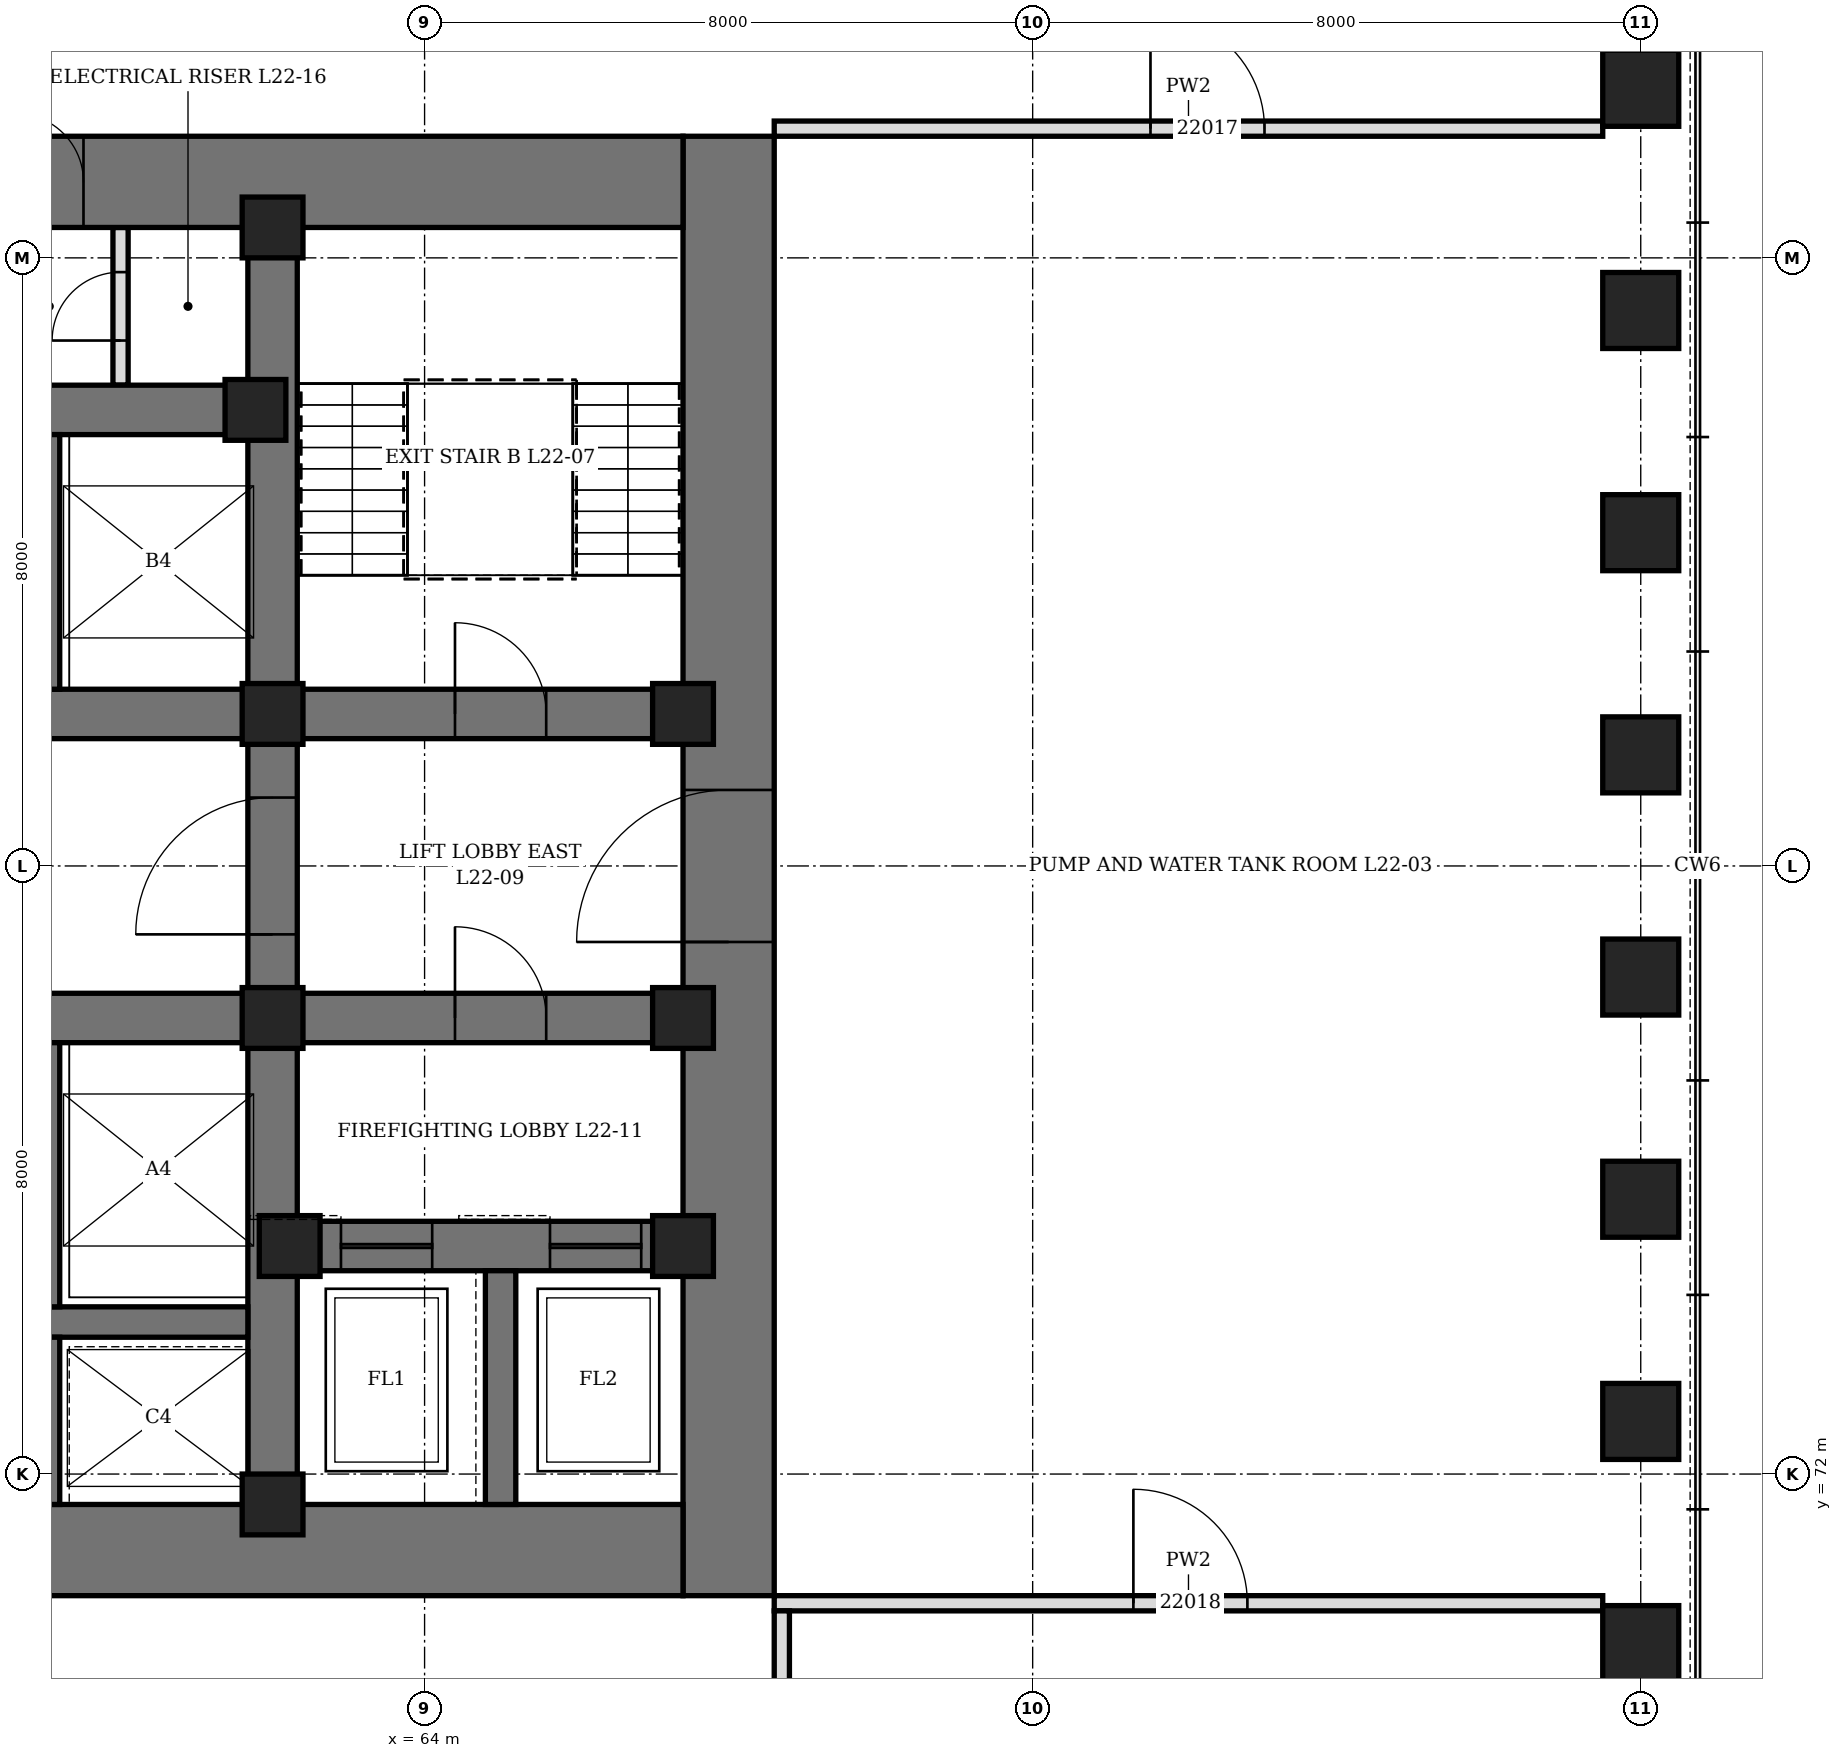
"""IFC4 building model, lengths in metres.
Left out: names, types, materials, properties, quantities, classifications, styles, units other than length and angle.
Written with IfcOpenShell. Run it as: python <this file> out.ifc"""

import sys

from ifc_helpers import new_model, si_unit, direction, frame, frame_2d, origin, origin_2d, place, context, subcontext, project, spatial, rectangle, hollow_rectangle, extrude, element, fill, save


model = new_model("IFC4")
c1 = context("Model", 3, precision=1e-05, world=origin(), true_north=direction((0.0, 1.0)))
c2 = subcontext(c1, "Body", "Model", "MODEL_VIEW")
j1 = project(units=[si_unit("LENGTHUNIT", "METRE"), si_unit("PLANEANGLEUNIT", "RADIAN")], contexts=[c1])
p1 = place(None, origin())
s1 = spatial("IfcSite", under=j1, at=p1, CompositionType="ELEMENT")
p2 = place(p1, origin())
s2 = spatial("IfcBuilding", under=s1, at=p2, CompositionType="ELEMENT")
p3 = place(p2, frame((0.0, 0.0, 102.1)))
s3 = spatial("IfcBuildingStorey", under=s2, at=p3, CompositionType="ELEMENT", Elevation=102.1)
for number, where, z_axis, x_axis in (
    (1, (80.0, 69.769, 0.0), (0.0, 0.0, 1.0), (0.0, 1.0, 0.0)),
    (2, (80.0, 72.692, 0.0), (0.0, 0.0, 1.0), (0.0, 1.0, 0.0)),
    (3, (80.0, 75.615, 0.0), (0.0, 0.0, 1.0), (0.0, 1.0, 0.0)),
    (4, (80.0, 78.539, 0.0), (0.0, 0.0, 1.0), (0.0, 1.0, 0.0)),
    (5, (80.0, 81.461, 0.0), (0.0, 0.0, 1.0), (0.0, 1.0, 0.0)),
    (6, (80.0, 84.385, 0.0), (0.0, 0.0, 1.0), (0.0, 1.0, 0.0)),
    (7, (80.0, 87.308, 0.0), (0.0, 0.0, 1.0), (0.0, 1.0, 0.0)),
    (8, (80.0, 90.231, 0.0), (0.0, 0.0, 1.0), (0.0, 1.0, 0.0)),
):
    element("IfcColumn", number, at=place(p3, frame(where, z_axis=z_axis, x_axis=x_axis)), inside=s3, PredefinedType="COLUMN", context=c2, shape_type="SweptSolid", body=[
        extrude(hollow_rectangle(XDim=1.0, YDim=1.0, WallThickness=0.35, at=origin_2d()), origin(), (0.0, 0.0, 1.0), 5.75),
    ])
p4 = place(p3, frame((68.0, 70.4, 0.0), z_axis=(0.0, 0.0, 1.0), x_axis=(0.0, 1.0, 0.0)))
e9 = element("IfcWall", 9, at=p4, inside=s3, PredefinedType="SHEAR", context=c2, shape_type="SweptSolid", body=[
    extrude(rectangle(XDim=19.2, YDim=1.2, at=frame_2d((9.6, 0.0))), origin(), (0.0, 0.0, 1.0), 6.0),
])
p5 = place(p4, frame((8.6, 0.0, 0.0)))
e10 = element("IfcOpeningElement", 10, at=p5, cuts=e9, PredefinedType="OPENING", context=c2, shape_type="SweptSolid", body=[
    extrude(rectangle(XDim=2.0, YDim=2.4, at=frame_2d((1.0, 1.2))), frame((0.0, 0.61, 0.0), z_axis=(0.0, -1.0, 0.0), x_axis=(1.0, 0.0, 0.0)), (0.0, 0.0, 1.0), 1.22),
])
p6 = place(p3, frame((44.6, 71.0, 0.0), z_axis=(0.0, 0.0, 1.0), x_axis=(1.0, 0.0, 0.0)))
e11 = element("IfcWall", 11, at=p6, inside=s3, PredefinedType="SHEAR", context=c2, shape_type="SweptSolid", body=[
    extrude(rectangle(XDim=22.8, YDim=1.2, at=frame_2d((11.4, 0.0))), origin(), (0.0, 0.0, 1.0), 6.0),
])
p7 = place(p3, frame((44.6, 89.0, 0.0), z_axis=(0.0, 0.0, 1.0), x_axis=(1.0, 0.0, 0.0)))
e12 = element("IfcWall", 12, at=p7, inside=s3, PredefinedType="SHEAR", context=c2, shape_type="SweptSolid", body=[
    extrude(rectangle(XDim=22.8, YDim=1.2, at=frame_2d((11.4, 0.0))), origin(), (0.0, 0.0, 1.0), 6.0),
])
p8 = place(p7, frame((7.9, 0.0, 0.0)))
e13 = element("IfcOpeningElement", 13, at=p8, cuts=e12, PredefinedType="OPENING", context=c2, shape_type="SweptSolid", body=[
    extrude(rectangle(XDim=1.0, YDim=2.1, at=frame_2d((0.5, 1.05))), frame((0.0, 0.61, 0.0), z_axis=(0.0, -1.0, 0.0), x_axis=(1.0, 0.0, 0.0)), (0.0, 0.0, 1.0), 1.22),
])
p9 = place(p7, frame((12.125, 0.0, 0.0)))
e14 = element("IfcOpeningElement", 14, at=p9, cuts=e12, PredefinedType="OPENING", context=c2, shape_type="SweptSolid", body=[
    extrude(rectangle(XDim=0.9, YDim=2.1, at=frame_2d((0.45, 1.05))), frame((0.0, 0.61, 0.0), z_axis=(0.0, -1.0, 0.0), x_axis=(1.0, 0.0, 0.0)), (0.0, 0.0, 1.0), 1.22),
])
p10 = place(p7, frame((14.012, 0.0, 0.0)))
e15 = element("IfcOpeningElement", 15, at=p10, cuts=e12, PredefinedType="OPENING", context=c2, shape_type="SweptSolid", body=[
    extrude(rectangle(XDim=0.9, YDim=2.1, at=frame_2d((0.45, 1.05))), frame((0.0, 0.61, 0.0), z_axis=(0.0, -1.0, 0.0), x_axis=(1.0, 0.0, 0.0)), (0.0, 0.0, 1.0), 1.22),
])
p11 = place(p3, frame((62.0, 71.6, 0.0), z_axis=(0.0, 0.0, 1.0), x_axis=(0.0, 1.0, 0.0)))
e16 = element("IfcWall", 16, at=p11, inside=s3, PredefinedType="SHEAR", context=c2, shape_type="SweptSolid", body=[
    extrude(rectangle(XDim=16.8, YDim=0.65, at=frame_2d((8.4, 0.0))), origin(), (0.0, 0.0, 1.0), 6.0),
])
p12 = place(p11, frame((7.5, 0.0, 0.0)))
e17 = element("IfcOpeningElement", 17, at=p12, cuts=e16, PredefinedType="OPENING", context=c2, shape_type="SweptSolid", body=[
    extrude(rectangle(XDim=1.8, YDim=2.4, at=frame_2d((0.9, 1.2))), frame((0.0, 0.335, 0.0), z_axis=(0.0, -1.0, 0.0), x_axis=(1.0, 0.0, 0.0)), (0.0, 0.0, 1.0), 0.67),
])
p13 = place(p3, frame((62.325, 75.0, 0.0), z_axis=(0.0, 0.0, 1.0), x_axis=(1.0, 0.0, 0.0)))
e18 = element("IfcWall", 18, at=p13, inside=s3, PredefinedType="SHEAR", context=c2, shape_type="SweptSolid", body=[
    extrude(rectangle(XDim=5.075, YDim=0.65, at=frame_2d((2.538, 0.0))), origin(), (0.0, 0.0, 1.0), 6.0),
])
p14 = place(p13, frame((0.575, 0.0, 0.0)))
e19 = element("IfcOpeningElement", 19, at=p14, cuts=e18, PredefinedType="OPENING", context=c2, shape_type="SweptSolid", body=[
    extrude(rectangle(XDim=1.2, YDim=2.2, at=frame_2d((0.6, 1.1))), frame((0.0, 0.335, 0.0), z_axis=(0.0, -1.0, 0.0), x_axis=(1.0, 0.0, 0.0)), (0.0, 0.0, 1.0), 0.67),
])
p15 = place(p13, frame((3.325, 0.0, 0.0)))
e20 = element("IfcOpeningElement", 20, at=p15, cuts=e18, PredefinedType="OPENING", context=c2, shape_type="SweptSolid", body=[
    extrude(rectangle(XDim=1.2, YDim=2.2, at=frame_2d((0.6, 1.1))), frame((0.0, 0.335, 0.0), z_axis=(0.0, -1.0, 0.0), x_axis=(1.0, 0.0, 0.0)), (0.0, 0.0, 1.0), 0.67),
])
p16 = place(p3, frame((62.325, 78.0, 0.0), z_axis=(0.0, 0.0, 1.0), x_axis=(1.0, 0.0, 0.0)))
e21 = element("IfcWall", 21, at=p16, inside=s3, PredefinedType="SHEAR", context=c2, shape_type="SweptSolid", body=[
    extrude(rectangle(XDim=5.075, YDim=0.65, at=frame_2d((2.538, 0.0))), origin(), (0.0, 0.0, 1.0), 6.0),
])
p17 = place(p16, frame((2.075, 0.0, 0.0)))
e22 = element("IfcOpeningElement", 22, at=p17, cuts=e21, PredefinedType="OPENING", context=c2, shape_type="SweptSolid", body=[
    extrude(rectangle(XDim=1.2, YDim=2.1, at=frame_2d((0.6, 1.05))), frame((0.0, 0.335, 0.0), z_axis=(0.0, -1.0, 0.0), x_axis=(1.0, 0.0, 0.0)), (0.0, 0.0, 1.0), 0.67),
])
p18 = place(p3, frame((62.325, 82.0, 0.0), z_axis=(0.0, 0.0, 1.0), x_axis=(1.0, 0.0, 0.0)))
e23 = element("IfcWall", 23, at=p18, inside=s3, PredefinedType="SHEAR", context=c2, shape_type="SweptSolid", body=[
    extrude(rectangle(XDim=5.075, YDim=0.65, at=frame_2d((2.538, 0.0))), origin(), (0.0, 0.0, 1.0), 6.0),
])
p19 = place(p18, frame((2.075, 0.0, 0.0)))
e24 = element("IfcOpeningElement", 24, at=p19, cuts=e23, PredefinedType="OPENING", context=c2, shape_type="SweptSolid", body=[
    extrude(rectangle(XDim=1.2, YDim=2.1, at=frame_2d((0.6, 1.05))), frame((0.0, 0.335, 0.0), z_axis=(0.0, -1.0, 0.0), x_axis=(1.0, 0.0, 0.0)), (0.0, 0.0, 1.0), 0.67),
])
for number, where, z_axis, x_axis in (
    (25, (50.325, 78.0, 0.0), (0.0, 0.0, 1.0), (1.0, 0.0, 0.0)),
    (26, (50.325, 82.0, 0.0), (0.0, 0.0, 1.0), (1.0, 0.0, 0.0)),
    (27, (50.325, 86.0, 0.0), (0.0, 0.0, 1.0), (1.0, 0.0, 0.0)),
):
    element("IfcWall", number, at=place(p3, frame(where, z_axis=z_axis, x_axis=x_axis)), inside=s3, PredefinedType="SHEAR", context=c2, shape_type="SweptSolid", body=[
        extrude(rectangle(XDim=11.35, YDim=0.65, at=frame_2d((5.675, 0.0))), origin(), (0.0, 0.0, 1.0), 6.0),
    ])
p20 = place(p3, frame((50.325, 74.0, 0.0), z_axis=(0.0, 0.0, 1.0), x_axis=(1.0, 0.0, 0.0)))
e28 = element("IfcWall", 28, at=p20, inside=s3, PredefinedType="SHEAR", context=c2, shape_type="SweptSolid", body=[
    extrude(rectangle(XDim=11.35, YDim=0.4, at=frame_2d((5.675, 0.0))), origin(), (0.0, 0.0, 1.0), 6.0),
])
p21 = place(p3, frame((59.0, 71.6, 0.0), z_axis=(0.0, 0.0, 1.0), x_axis=(0.0, 1.0, 0.0)))
e29 = element("IfcWall", 29, at=p21, inside=s3, PredefinedType="SHEAR", context=c2, shape_type="SweptSolid", body=[
    extrude(rectangle(XDim=2.2, YDim=0.4, at=frame_2d((1.1, 0.0))), origin(), (0.0, 0.0, 1.0), 6.0),
])
p22 = place(p3, frame((59.0, 74.2, 0.0), z_axis=(0.0, 0.0, 1.0), x_axis=(0.0, 1.0, 0.0)))
e30 = element("IfcWall", 30, at=p22, inside=s3, PredefinedType="SHEAR", context=c2, shape_type="SweptSolid", body=[
    extrude(rectangle(XDim=3.475, YDim=0.4, at=frame_2d((1.738, 0.0))), origin(), (0.0, 0.0, 1.0), 6.0),
])
p23 = place(p3, frame((59.0, 82.325, 0.0), z_axis=(0.0, 0.0, 1.0), x_axis=(0.0, 1.0, 0.0)))
e31 = element("IfcWall", 31, at=p23, inside=s3, PredefinedType="SHEAR", context=c2, shape_type="SweptSolid", body=[
    extrude(rectangle(XDim=3.35, YDim=0.4, at=frame_2d((1.675, 0.0))), origin(), (0.0, 0.0, 1.0), 6.0),
])
p24 = place(p3, frame((65.0, 71.6, 0.0), z_axis=(0.0, 0.0, 1.0), x_axis=(0.0, 1.0, 0.0)))
e32 = element("IfcWall", 32, at=p24, inside=s3, PredefinedType="SHEAR", context=c2, shape_type="SweptSolid", body=[
    extrude(rectangle(XDim=3.075, YDim=0.4, at=frame_2d((1.538, 0.0))), origin(), (0.0, 0.0, 1.0), 6.0),
])
for number, where, z_axis, x_axis in (
    (33, (61.775, 86.0, 0.0), (0.0, 0.0, 1.0), (1.0, 0.0, 0.0)),
    (34, (62.0, 71.6, 0.0), (0.0, 0.0, 1.0), (1.0, 0.0, 0.0)),
    (35, (62.0, 78.0, 0.0), (0.0, 0.0, 1.0), (1.0, 0.0, 0.0)),
    (36, (62.0, 82.0, 0.0), (0.0, 0.0, 1.0), (1.0, 0.0, 0.0)),
    (37, (62.0, 88.4, 0.0), (0.0, 0.0, 1.0), (1.0, 0.0, 0.0)),
    (38, (62.225, 75.0, 0.0), (0.0, 0.0, 1.0), (1.0, 0.0, 0.0)),
    (39, (67.4, 75.0, 0.0), (0.0, 0.0, 1.0), (1.0, 0.0, 0.0)),
    (40, (67.4, 78.0, 0.0), (0.0, 0.0, 1.0), (1.0, 0.0, 0.0)),
    (41, (67.4, 82.0, 0.0), (0.0, 0.0, 1.0), (1.0, 0.0, 0.0)),
):
    element("IfcColumn", number, at=place(p3, frame(where, z_axis=z_axis, x_axis=x_axis)), inside=s3, PredefinedType="COLUMN", context=c2, shape_type="SweptSolid", body=[
        extrude(hollow_rectangle(XDim=0.8, YDim=0.8, WallThickness=0.1, at=origin_2d()), origin(), (0.0, 0.0, 1.0), 6.0),
    ])
p25 = place(p3, frame((60.0, 86.325, 0.0), z_axis=(0.0, 0.0, 1.0), x_axis=(0.0, 1.0, 0.0)))
e42 = element("IfcWall", 42, at=p25, inside=s3, PredefinedType="PARTITIONING", context=c2, shape_type="SweptSolid", body=[
    extrude(rectangle(XDim=2.075, YDim=0.2, at=frame_2d((1.038, 0.0))), origin(), (0.0, 0.0, 1.0), 5.75),
])
p26 = place(p25, frame((0.587, 0.0, 0.0)))
e43 = element("IfcOpeningElement", 43, at=p26, cuts=e42, PredefinedType="OPENING", context=c2, shape_type="SweptSolid", body=[
    extrude(rectangle(XDim=0.9, YDim=2.1, at=frame_2d((0.45, 1.05))), frame((0.0, 0.11, 0.0), z_axis=(0.0, -1.0, 0.0), x_axis=(1.0, 0.0, 0.0)), (0.0, 0.0, 1.0), 0.22),
])
p27 = place(p3, frame((68.6, 89.7, 0.0), z_axis=(0.0, 0.0, 1.0), x_axis=(1.0, 0.0, 0.0)))
e44 = element("IfcWall", 44, at=p27, inside=s3, PredefinedType="PARTITIONING", context=c2, shape_type="SweptSolid", body=[
    extrude(rectangle(XDim=10.9, YDim=0.2, at=frame_2d((5.45, 0.0))), origin(), (0.0, 0.0, 1.0), 4.25),
])
p28 = place(p27, frame((4.95, 0.0, 0.0)))
e45 = element("IfcOpeningElement", 45, at=p28, cuts=e44, PredefinedType="OPENING", context=c2, shape_type="SweptSolid", body=[
    extrude(rectangle(XDim=1.5, YDim=2.4, at=frame_2d((0.75, 1.2))), frame((0.0, 0.11, 0.0), z_axis=(0.0, -1.0, 0.0), x_axis=(1.0, 0.0, 0.0)), (0.0, 0.0, 1.0), 0.22),
])
p29 = place(p3, frame((68.6, 70.3, 0.0), z_axis=(0.0, 0.0, 1.0), x_axis=(1.0, 0.0, 0.0)))
e46 = element("IfcWall", 46, at=p29, inside=s3, PredefinedType="PARTITIONING", context=c2, shape_type="SweptSolid", body=[
    extrude(rectangle(XDim=10.9, YDim=0.2, at=frame_2d((5.45, 0.0))), origin(), (0.0, 0.0, 1.0), 4.25),
])
p30 = place(p29, frame((4.725, 0.0, 0.0)))
e47 = element("IfcOpeningElement", 47, at=p30, cuts=e46, PredefinedType="OPENING", context=c2, shape_type="SweptSolid", body=[
    extrude(rectangle(XDim=1.5, YDim=2.4, at=frame_2d((0.75, 1.2))), frame((0.0, 0.11, 0.0), z_axis=(0.0, -1.0, 0.0), x_axis=(1.0, 0.0, 0.0)), (0.0, 0.0, 1.0), 0.22),
])
p31 = place(p3, frame((68.7, 70.2, 0.0), z_axis=(0.0, 0.0, 1.0), x_axis=(0.0, -1.0, 0.0)))
e48 = element("IfcWall", 48, at=p31, inside=s3, PredefinedType="PARTITIONING", context=c2, shape_type="SweptSolid", body=[
    extrude(rectangle(XDim=13.7, YDim=0.2, at=frame_2d((6.85, 0.0))), origin(), (0.0, 0.0, 1.0), 4.25),
])
p32 = place(p31, frame((6.025, 0.0, 0.0)))
e49 = element("IfcOpeningElement", 49, at=p32, cuts=e48, PredefinedType="OPENING", context=c2, shape_type="SweptSolid", body=[
    extrude(rectangle(XDim=1.5, YDim=2.4, at=frame_2d((0.75, 1.2))), frame((0.0, 0.11, 0.0), z_axis=(0.0, -1.0, 0.0), x_axis=(1.0, 0.0, 0.0)), (0.0, 0.0, 1.0), 0.22),
])
p33 = place(p10, origin())
e50 = element("IfcDoor", 50, at=p33, inside=s3, OperationType="SINGLE_SWING_LEFT", PredefinedType="DOOR", context=c2, shape_type="SweptSolid", body=[
    extrude(rectangle(XDim=0.9, YDim=2.1, at=frame_2d((0.45, 1.05))), frame((0.0, 0.35, 0.0), z_axis=(0.0, -1.0, 0.0), x_axis=(1.0, 0.0, 0.0)), (0.0, 0.0, 1.0), 0.7),
])
fill(e15, e50)
p34 = place(p26, origin())
e51 = element("IfcDoor", 51, at=p34, inside=s3, OperationType="SINGLE_SWING_LEFT", PredefinedType="DOOR", context=c2, shape_type="SweptSolid", body=[
    extrude(rectangle(XDim=0.9, YDim=2.1, at=frame_2d((0.45, 1.05))), frame((0.0, 0.1, 0.0), z_axis=(0.0, -1.0, 0.0), x_axis=(1.0, 0.0, 0.0)), (0.0, 0.0, 1.0), 0.199),
])
fill(e43, e51)
p35 = place(p19, origin())
e52 = element("IfcDoor", 52, at=p35, inside=s3, OperationType="SINGLE_SWING_LEFT", PredefinedType="DOOR", context=c2, shape_type="SweptSolid", body=[
    extrude(rectangle(XDim=1.2, YDim=2.1, at=frame_2d((0.6, 1.05))), frame((0.0, 0.325, 0.0), z_axis=(0.0, -1.0, 0.0), x_axis=(1.0, 0.0, 0.0)), (0.0, 0.0, 1.0), 0.649),
])
fill(e24, e52)
p36 = place(p5, origin())
e53 = element("IfcDoor", 53, at=p36, inside=s3, OperationType="DOUBLE_DOOR_SINGLE_SWING", PredefinedType="DOOR", context=c2, shape_type="SweptSolid", body=[
    extrude(rectangle(XDim=2.0, YDim=2.4, at=frame_2d((1.0, 1.2))), frame((0.0, 0.35, 0.0), z_axis=(0.0, -1.0, 0.0), x_axis=(1.0, 0.0, 0.0)), (0.0, 0.0, 1.0), 0.7),
])
fill(e10, e53)
p37 = place(p12, origin())
e54 = element("IfcDoor", 54, at=p37, inside=s3, OperationType="DOUBLE_DOOR_SINGLE_SWING", PredefinedType="DOOR", context=c2, shape_type="SweptSolid", body=[
    extrude(rectangle(XDim=1.8, YDim=2.4, at=frame_2d((0.9, 1.2))), frame((0.0, 0.325, 0.0), z_axis=(0.0, -1.0, 0.0), x_axis=(1.0, 0.0, 0.0)), (0.0, 0.0, 1.0), 0.649),
])
fill(e17, e54)
p38 = place(p17, origin())
e55 = element("IfcDoor", 55, at=p38, inside=s3, OperationType="SINGLE_SWING_RIGHT", PredefinedType="DOOR", context=c2, shape_type="SweptSolid", body=[
    extrude(rectangle(XDim=1.2, YDim=2.1, at=frame_2d((0.6, 1.05))), frame((0.0, 0.325, 0.0), z_axis=(0.0, -1.0, 0.0), x_axis=(1.0, 0.0, 0.0)), (0.0, 0.0, 1.0), 0.649),
])
fill(e22, e55)
p39 = place(p14, origin())
e56 = element("IfcDoor", 56, at=p39, inside=s3, OperationType="SLIDING_TO_LEFT", PredefinedType="DOOR", context=c2, shape_type="SweptSolid", body=[
    extrude(rectangle(XDim=1.2, YDim=2.2, at=frame_2d((0.6, 1.1))), frame((0.0, 0.325, 0.0), z_axis=(0.0, -1.0, 0.0), x_axis=(1.0, 0.0, 0.0)), (0.0, 0.0, 1.0), 0.649),
])
fill(e19, e56)
p40 = place(p15, origin())
e57 = element("IfcDoor", 57, at=p40, inside=s3, OperationType="SLIDING_TO_LEFT", PredefinedType="DOOR", context=c2, shape_type="SweptSolid", body=[
    extrude(rectangle(XDim=1.2, YDim=2.2, at=frame_2d((0.6, 1.1))), frame((0.0, 0.325, 0.0), z_axis=(0.0, -1.0, 0.0), x_axis=(1.0, 0.0, 0.0)), (0.0, 0.0, 1.0), 0.649),
])
fill(e20, e57)
p41 = place(p28, origin())
e58 = element("IfcDoor", 58, at=p41, inside=s3, OperationType="DOUBLE_DOOR_SINGLE_SWING", PredefinedType="DOOR", context=c2, shape_type="SweptSolid", body=[
    extrude(rectangle(XDim=1.5, YDim=2.4, at=frame_2d((0.75, 1.2))), frame((0.0, 0.1, 0.0), z_axis=(0.0, -1.0, 0.0), x_axis=(1.0, 0.0, 0.0)), (0.0, 0.0, 1.0), 0.199),
])
fill(e45, e58)
p42 = place(p30, origin())
e59 = element("IfcDoor", 59, at=p42, inside=s3, OperationType="DOUBLE_DOOR_SINGLE_SWING", PredefinedType="DOOR", context=c2, shape_type="SweptSolid", body=[
    extrude(rectangle(XDim=1.5, YDim=2.4, at=frame_2d((0.75, 1.2))), frame((0.0, 0.1, 0.0), z_axis=(0.0, -1.0, 0.0), x_axis=(1.0, 0.0, 0.0)), (0.0, 0.0, 1.0), 0.199),
])
fill(e47, e59)
save(model, sys.argv[1])
